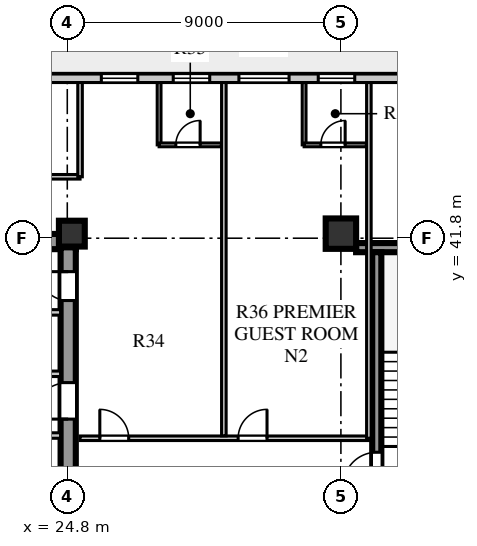
"""IFC4 building model, lengths in metres.
Left out: names, types, materials, properties, quantities, classifications, styles, units other than length and angle.
Written with IfcOpenShell. Run it as: python <this file> out.ifc"""

import sys

from ifc_helpers import new_model, si_unit, direction, frame, frame_2d, origin, origin_2d, place, context, subcontext, project, spatial, rectangle, extrude, element, fill, save


model = new_model("IFC4")
c1 = context("Model", 3, precision=1e-05, world=origin(), true_north=direction((0.0, 1.0)))
c2 = subcontext(c1, "Body", "Model", "MODEL_VIEW")
j1 = project(units=[si_unit("LENGTHUNIT", "METRE"), si_unit("PLANEANGLEUNIT", "RADIAN")], contexts=[c1])
p1 = place(None, origin())
s1 = spatial("IfcSite", under=j1, at=p1, CompositionType="ELEMENT")
p2 = place(p1, origin())
s2 = spatial("IfcBuilding", under=s1, at=p2, CompositionType="ELEMENT")
p3 = place(p2, frame((0.0, 0.0, 127.1)))
s3 = spatial("IfcBuildingStorey", under=s2, at=p3, CompositionType="ELEMENT", Elevation=127.1)
p4 = place(p3, frame((15.4, 41.69, 0.0), z_axis=(0.0, 0.0, 1.0), x_axis=(1.0, 0.0, 0.0)))
e1 = element("IfcWall", 1, at=p4, inside=s3, PredefinedType="SHEAR", context=c2, shape_type="SweptSolid", body=[
    extrude(rectangle(XDim=9.68, YDim=0.5, at=frame_2d((4.84, 0.0))), origin(), (0.0, 0.0, 1.0), 3.6),
])
p5 = place(p3, frame((24.83, 15.74, 0.0), z_axis=(0.0, 0.0, 1.0), x_axis=(0.0, 1.0, 0.0)))
e2 = element("IfcWall", 2, at=p5, inside=s3, PredefinedType="SHEAR", context=c2, shape_type="SweptSolid", body=[
    extrude(rectangle(XDim=25.76, YDim=0.5, at=frame_2d((12.88, 0.0))), origin(), (0.0, 0.0, 1.0), 3.6),
])
p6 = place(p5, frame((1.61, 0.0, 0.0)))
e3 = element("IfcOpeningElement", 3, at=p6, cuts=e2, PredefinedType="OPENING", context=c2, shape_type="SweptSolid", body=[
    extrude(rectangle(XDim=1.2, YDim=2.1, at=frame_2d((0.6, 1.05))), frame((0.0, 0.26, 0.0), z_axis=(0.0, -1.0, 0.0), x_axis=(1.0, 0.0, 0.0)), (0.0, 0.0, 1.0), 0.52),
])
p7 = place(p5, frame((6.78, 0.0, 0.0)))
e4 = element("IfcOpeningElement", 4, at=p7, cuts=e2, PredefinedType="OPENING", context=c2, shape_type="SweptSolid", body=[
    extrude(rectangle(XDim=0.85, YDim=2.06, at=frame_2d((0.425, 1.03))), frame((0.0, 0.26, 0.0), z_axis=(0.0, -1.0, 0.0), x_axis=(1.0, 0.0, 0.0)), (0.0, 0.0, 1.0), 0.52),
])
p8 = place(p5, frame((12.11, 0.0, 0.0)))
e5 = element("IfcOpeningElement", 5, at=p8, cuts=e2, PredefinedType="OPENING", context=c2, shape_type="SweptSolid", body=[
    extrude(rectangle(XDim=1.5, YDim=2.12, at=frame_2d((0.75, 1.06))), frame((0.0, 0.26, 0.0), z_axis=(0.0, -1.0, 0.0), x_axis=(1.0, 0.0, 0.0)), (0.0, 0.0, 1.0), 0.52),
])
p9 = place(p5, frame((20.11, 0.0, 0.0)))
e6 = element("IfcOpeningElement", 6, at=p9, cuts=e2, PredefinedType="OPENING", context=c2, shape_type="SweptSolid", body=[
    extrude(rectangle(XDim=1.2, YDim=2.12, at=frame_2d((0.6, 1.06))), frame((0.0, 0.26, 0.0), z_axis=(0.0, -1.0, 0.0), x_axis=(1.0, 0.0, 0.0)), (0.0, 0.0, 1.0), 0.52),
])
p10 = place(p5, frame((24.01, 0.0, 0.0)))
e7 = element("IfcOpeningElement", 7, at=p10, cuts=e2, PredefinedType="OPENING", context=c2, shape_type="SweptSolid", body=[
    extrude(rectangle(XDim=0.95, YDim=2.1, at=frame_2d((0.475, 1.05))), frame((0.0, 0.26, 0.0), z_axis=(0.0, -1.0, 0.0), x_axis=(1.0, 0.0, 0.0)), (0.0, 0.0, 1.0), 0.52),
])
p11 = place(p3, frame((34.3, 41.49, 0.0), z_axis=(0.0, 0.0, 1.0), x_axis=(1.0, 0.0, 0.0)))
e8 = element("IfcWall", 8, at=p11, inside=s3, PredefinedType="SHEAR", context=c2, shape_type="SweptSolid", body=[
    extrude(rectangle(XDim=4.57, YDim=0.3, at=frame_2d((2.285, 0.0))), origin(), (0.0, 0.0, 1.0), 3.6),
])
p12 = place(p3, frame((34.98, 33.31, 0.0), z_axis=(0.0, 0.0, 1.0), x_axis=(0.0, 1.0, 0.0)))
e9 = element("IfcWall", 9, at=p12, inside=s3, PredefinedType="SHEAR", context=c2, shape_type="SweptSolid", body=[
    extrude(rectangle(XDim=8.03, YDim=0.3, at=frame_2d((4.015, 0.0))), origin(), (0.0, 0.0, 1.0), 3.6),
])
p13 = place(p12, frame((0.35, 0.0, 0.0)))
e10 = element("IfcOpeningElement", 10, at=p13, cuts=e9, PredefinedType="OPENING", context=c2, shape_type="SweptSolid", body=[
    extrude(rectangle(XDim=1.1, YDim=2.1, at=frame_2d((0.55, 1.05))), frame((0.0, 0.16, 0.0), z_axis=(0.0, -1.0, 0.0), x_axis=(1.0, 0.0, 0.0)), (0.0, 0.0, 1.0), 0.32),
])
p14 = place(p3, frame((24.95, 41.95, 0.0), z_axis=(0.0, 0.0, 1.0), x_axis=(1.0, 0.0, 0.0)))
e11 = element("IfcColumn", 11, at=p14, inside=s3, PredefinedType="COLUMN", context=c2, shape_type="SweptSolid", body=[
    extrude(rectangle(XDim=0.85, YDim=0.85, at=origin_2d()), origin(), (0.0, 0.0, 1.0), 3.6),
])
p15 = place(p3, frame((33.8, 41.95, 0.0), z_axis=(0.0, 0.0, 1.0), x_axis=(1.0, 0.0, 0.0)))
e12 = element("IfcColumn", 12, at=p15, inside=s3, PredefinedType="COLUMN", context=c2, shape_type="SweptSolid", body=[
    extrude(rectangle(XDim=1.0, YDim=1.0, at=origin_2d()), origin(), (0.0, 0.0, 1.0), 3.6),
])
p16 = place(p3, frame((45.35, 47.06, 0.0), z_axis=(0.0, 0.0, 1.0), x_axis=(-1.0, 0.0, 0.0)))
e13 = element("IfcWall", 13, at=p16, inside=s3, PredefinedType="STANDARD", context=c2, shape_type="SweptSolid", body=[
    extrude(rectangle(XDim=32.1, YDim=0.28, at=frame_2d((16.05, 0.0))), origin(), (0.0, 0.0, 1.0), 3.6),
])
p17 = place(p16, frame((30.15, 0.0, 0.0)))
e14 = element("IfcOpeningElement", 14, at=p17, cuts=e13, PredefinedType="OPENING", context=c2, shape_type="SweptSolid", body=[
    extrude(rectangle(XDim=1.0, YDim=2.05, at=frame_2d((0.5, 1.025))), frame((0.0, 0.15, 0.0), z_axis=(0.0, -1.0, 0.0), x_axis=(1.0, 0.0, 0.0)), (0.0, 0.0, 1.0), 0.3),
])
p18 = place(p16, frame((23.97, 0.0, 0.8)))
e15 = element("IfcOpeningElement", 15, at=p18, cuts=e13, PredefinedType="OPENING", context=c2, shape_type="SweptSolid", body=[
    extrude(rectangle(XDim=2.4, YDim=2.05, at=frame_2d((1.2, 1.025))), frame((0.0, 0.15, 0.0), z_axis=(0.0, -1.0, 0.0), x_axis=(1.0, 0.0, 0.0)), (0.0, 0.0, 1.0), 0.3),
])
p19 = place(p16, frame((18.23, 0.0, 0.8)))
e16 = element("IfcOpeningElement", 16, at=p19, cuts=e13, PredefinedType="OPENING", context=c2, shape_type="SweptSolid", body=[
    extrude(rectangle(XDim=1.2, YDim=1.75, at=frame_2d((0.6, 0.875))), frame((0.0, 0.15, 0.0), z_axis=(0.0, -1.0, 0.0), x_axis=(1.0, 0.0, 0.0)), (0.0, 0.0, 1.0), 0.3),
])
p20 = place(p16, frame((15.865, 0.0, 0.8)))
e17 = element("IfcOpeningElement", 17, at=p20, cuts=e13, PredefinedType="OPENING", context=c2, shape_type="SweptSolid", body=[
    extrude(rectangle(XDim=1.2, YDim=1.75, at=frame_2d((0.6, 0.875))), frame((0.0, 0.15, 0.0), z_axis=(0.0, -1.0, 0.0), x_axis=(1.0, 0.0, 0.0)), (0.0, 0.0, 1.0), 0.3),
])
p21 = place(p16, frame((13.255, 0.0, 0.8)))
e18 = element("IfcOpeningElement", 18, at=p21, cuts=e13, PredefinedType="OPENING", context=c2, shape_type="SweptSolid", body=[
    extrude(rectangle(XDim=1.65, YDim=1.95, at=frame_2d((0.825, 0.975))), frame((0.0, 0.15, 0.0), z_axis=(0.0, -1.0, 0.0), x_axis=(1.0, 0.0, 0.0)), (0.0, 0.0, 1.0), 0.3),
])
p22 = place(p16, frame((11.095, 0.0, 0.8)))
e19 = element("IfcOpeningElement", 19, at=p22, cuts=e13, PredefinedType="OPENING", context=c2, shape_type="SweptSolid", body=[
    extrude(rectangle(XDim=1.2, YDim=1.75, at=frame_2d((0.6, 0.875))), frame((0.0, 0.15, 0.0), z_axis=(0.0, -1.0, 0.0), x_axis=(1.0, 0.0, 0.0)), (0.0, 0.0, 1.0), 0.3),
])
p23 = place(p16, frame((6.455, 0.0, 0.8)))
e20 = element("IfcOpeningElement", 20, at=p23, cuts=e13, PredefinedType="OPENING", context=c2, shape_type="SweptSolid", body=[
    extrude(rectangle(XDim=2.25, YDim=2.0, at=frame_2d((1.125, 1.0))), frame((0.0, 0.15, 0.0), z_axis=(0.0, -1.0, 0.0), x_axis=(1.0, 0.0, 0.0)), (0.0, 0.0, 1.0), 0.3),
])
p24 = place(p16, frame((1.42, 0.0, 0.8)))
e21 = element("IfcOpeningElement", 21, at=p24, cuts=e13, PredefinedType="OPENING", context=c2, shape_type="SweptSolid", body=[
    extrude(rectangle(XDim=1.8, YDim=2.0, at=frame_2d((0.9, 1.0))), frame((0.0, 0.15, 0.0), z_axis=(0.0, -1.0, 0.0), x_axis=(1.0, 0.0, 0.0)), (0.0, 0.0, 1.0), 0.3),
])
p25 = place(p3, frame((22.02, 35.31, 0.0), z_axis=(0.0, 0.0, 1.0), x_axis=(1.0, 0.0, 0.0)))
e22 = element("IfcWall", 22, at=p25, inside=s3, PredefinedType="SOLIDWALL", context=c2, shape_type="SweptSolid", body=[
    extrude(rectangle(XDim=2.56, YDim=0.18, at=frame_2d((1.28, 0.0))), origin(), (0.0, 0.0, 1.0), 3.6),
])
p26 = place(p25, frame((0.55, 0.0, 0.0)))
e23 = element("IfcOpeningElement", 23, at=p26, cuts=e22, PredefinedType="OPENING", context=c2, shape_type="SweptSolid", body=[
    extrude(rectangle(XDim=1.0, YDim=2.1, at=frame_2d((0.5, 1.05))), frame((0.0, 0.1, 0.0), z_axis=(0.0, -1.0, 0.0), x_axis=(1.0, 0.0, 0.0)), (0.0, 0.0, 1.0), 0.2),
])
p27 = place(p3, frame((19.64, 37.34, 0.0), z_axis=(0.0, 0.0, 1.0), x_axis=(1.0, 0.0, 0.0)))
e24 = element("IfcWall", 24, at=p27, inside=s3, PredefinedType="SOLIDWALL", context=c2, shape_type="SweptSolid", body=[
    extrude(rectangle(XDim=4.94, YDim=0.18, at=frame_2d((2.47, 0.0))), origin(), (0.0, 0.0, 1.0), 3.6),
])
p28 = place(p27, frame((0.45, 0.0, 0.0)))
e25 = element("IfcOpeningElement", 25, at=p28, cuts=e24, PredefinedType="OPENING", context=c2, shape_type="SweptSolid", body=[
    extrude(rectangle(XDim=1.0, YDim=2.1, at=frame_2d((0.5, 1.05))), frame((0.0, 0.1, 0.0), z_axis=(0.0, -1.0, 0.0), x_axis=(1.0, 0.0, 0.0)), (0.0, 0.0, 1.0), 0.2),
])
p29 = place(p27, frame((2.5, 0.0, 0.0)))
e26 = element("IfcOpeningElement", 26, at=p29, cuts=e24, PredefinedType="OPENING", context=c2, shape_type="SweptSolid", body=[
    extrude(rectangle(XDim=1.0, YDim=2.1, at=frame_2d((0.5, 1.05))), frame((0.0, 0.1, 0.0), z_axis=(0.0, -1.0, 0.0), x_axis=(1.0, 0.0, 0.0)), (0.0, 0.0, 1.0), 0.2),
])
p30 = place(p3, frame((19.64, 39.36, 0.0), z_axis=(0.0, 0.0, 1.0), x_axis=(1.0, 0.0, 0.0)))
e27 = element("IfcWall", 27, at=p30, inside=s3, PredefinedType="SOLIDWALL", context=c2, shape_type="SweptSolid", body=[
    extrude(rectangle(XDim=4.94, YDim=0.18, at=frame_2d((2.47, 0.0))), origin(), (0.0, 0.0, 1.0), 3.6),
])
p31 = place(p3, frame((25.22, 35.22, 0.0), z_axis=(0.0, 0.0, 1.0), x_axis=(1.0, 0.0, 0.0)))
e28 = element("IfcWall", 28, at=p31, inside=s3, PredefinedType="PARTITIONING", context=c2, shape_type="SweptSolid", body=[
    extrude(rectangle(XDim=9.5, YDim=0.15, at=frame_2d((4.75, 0.0))), origin(), (0.0, 0.0, 1.0), 3.6),
])
p32 = place(p31, frame((0.65, 0.0, 0.0)))
e29 = element("IfcOpeningElement", 29, at=p32, cuts=e28, PredefinedType="OPENING", context=c2, shape_type="SweptSolid", body=[
    extrude(rectangle(XDim=0.95, YDim=2.1, at=frame_2d((0.475, 1.05))), frame((0.0, 0.085, 0.0), z_axis=(0.0, -1.0, 0.0), x_axis=(1.0, 0.0, 0.0)), (0.0, 0.0, 1.0), 0.17),
])
p33 = place(p31, frame((5.2, 0.0, 0.0)))
e30 = element("IfcOpeningElement", 30, at=p33, cuts=e28, PredefinedType="OPENING", context=c2, shape_type="SweptSolid", body=[
    extrude(rectangle(XDim=0.95, YDim=2.1, at=frame_2d((0.475, 1.05))), frame((0.0, 0.085, 0.0), z_axis=(0.0, -1.0, 0.0), x_axis=(1.0, 0.0, 0.0)), (0.0, 0.0, 1.0), 0.17),
])
p34 = place(p3, frame((13.59, 43.82, 0.0), z_axis=(0.0, 0.0, 1.0), x_axis=(1.0, 0.0, 0.0)))
e31 = element("IfcWall", 31, at=p34, inside=s3, PredefinedType="PARTITIONING", context=c2, shape_type="SweptSolid", body=[
    extrude(rectangle(XDim=11.63, YDim=0.15, at=frame_2d((5.815, 0.0))), origin(), (0.0, 0.0, 1.0), 3.6),
])
p35 = place(p34, frame((4.56, 0.0, 0.0)))
e32 = element("IfcOpeningElement", 32, at=p35, cuts=e31, PredefinedType="OPENING", context=c2, shape_type="SweptSolid", body=[
    extrude(rectangle(XDim=1.0, YDim=2.08, at=frame_2d((0.5, 1.04))), frame((0.0, 0.085, 0.0), z_axis=(0.0, -1.0, 0.0), x_axis=(1.0, 0.0, 0.0)), (0.0, 0.0, 1.0), 0.17),
])
p36 = place(p3, frame((25.22, 43.82, 0.0), z_axis=(0.0, 0.0, 1.0), x_axis=(0.0, 1.0, 0.0)))
e33 = element("IfcWall", 33, at=p36, inside=s3, PredefinedType="PARTITIONING", context=c2, shape_type="SweptSolid", body=[
    extrude(rectangle(XDim=3.1, YDim=0.15, at=frame_2d((1.55, 0.0))), origin(), (0.0, 0.0, 1.0), 3.1),
])
p37 = place(p3, frame((34.72, 35.22, 0.0), z_axis=(0.0, 0.0, 1.0), x_axis=(0.0, 1.0, 0.0)))
e34 = element("IfcWall", 34, at=p37, inside=s3, PredefinedType="PARTITIONING", context=c2, shape_type="SweptSolid", body=[
    extrude(rectangle(XDim=11.7, YDim=0.15, at=frame_2d((5.85, 0.0))), origin(), (0.0, 0.0, 1.0), 3.6),
])
p38 = place(p3, frame((29.95, 35.3, 0.0), z_axis=(0.0, 0.0, 1.0), x_axis=(0.0, 1.0, 0.0)))
e35 = element("IfcWall", 35, at=p38, inside=s3, PredefinedType="PARTITIONING", context=c2, shape_type="SweptSolid", body=[
    extrude(rectangle(XDim=11.62, YDim=0.15, at=frame_2d((5.81, 0.0))), origin(), (0.0, 0.0, 1.0), 3.6),
])
p39 = place(p3, frame((27.82, 44.87, 0.0), z_axis=(0.0, 0.0, 1.0), x_axis=(0.0, 1.0, 0.0)))
e36 = element("IfcWall", 36, at=p39, inside=s3, PredefinedType="PLUMBINGWALL", context=c2, shape_type="SweptSolid", body=[
    extrude(rectangle(XDim=2.05, YDim=0.125, at=frame_2d((1.025, 0.0))), origin(), (0.0, 0.0, 1.0), 3.6),
])
p40 = place(p3, frame((27.82, 44.87, 0.0), z_axis=(0.0, 0.0, 1.0), x_axis=(1.0, 0.0, 0.0)))
e37 = element("IfcWall", 37, at=p40, inside=s3, PredefinedType="PLUMBINGWALL", context=c2, shape_type="SweptSolid", body=[
    extrude(rectangle(XDim=2.05, YDim=0.125, at=frame_2d((1.025, 0.0))), origin(), (0.0, 0.0, 1.0), 3.6),
])
p41 = place(p40, frame((0.55, 0.0, 0.0)))
e38 = element("IfcOpeningElement", 38, at=p41, cuts=e37, PredefinedType="OPENING", context=c2, shape_type="SweptSolid", body=[
    extrude(rectangle(XDim=0.8, YDim=2.05, at=frame_2d((0.4, 1.025))), frame((0.0, 0.073, 0.0), z_axis=(0.0, -1.0, 0.0), x_axis=(1.0, 0.0, 0.0)), (0.0, 0.0, 1.0), 0.145),
])
p42 = place(p3, frame((32.59, 44.87, 0.0), z_axis=(0.0, 0.0, 1.0), x_axis=(0.0, 1.0, 0.0)))
e39 = element("IfcWall", 39, at=p42, inside=s3, PredefinedType="PLUMBINGWALL", context=c2, shape_type="SweptSolid", body=[
    extrude(rectangle(XDim=2.05, YDim=0.125, at=frame_2d((1.025, 0.0))), origin(), (0.0, 0.0, 1.0), 3.6),
])
p43 = place(p3, frame((32.59, 44.87, 0.0), z_axis=(0.0, 0.0, 1.0), x_axis=(1.0, 0.0, 0.0)))
e40 = element("IfcWall", 40, at=p43, inside=s3, PredefinedType="PLUMBINGWALL", context=c2, shape_type="SweptSolid", body=[
    extrude(rectangle(XDim=2.05, YDim=0.125, at=frame_2d((1.025, 0.0))), origin(), (0.0, 0.0, 1.0), 3.6),
])
p44 = place(p43, frame((0.55, 0.0, 0.0)))
e41 = element("IfcOpeningElement", 41, at=p44, cuts=e40, PredefinedType="OPENING", context=c2, shape_type="SweptSolid", body=[
    extrude(rectangle(XDim=0.8, YDim=2.05, at=frame_2d((0.4, 1.025))), frame((0.0, 0.073, 0.0), z_axis=(0.0, -1.0, 0.0), x_axis=(1.0, 0.0, 0.0)), (0.0, 0.0, 1.0), 0.145),
])
p45 = place(p19, origin())
e42 = element("IfcWindow", 42, at=p45, inside=s3, PartitioningType="SINGLE_PANEL", PredefinedType="WINDOW", context=c2, shape_type="SweptSolid", body=[
    extrude(rectangle(XDim=1.2, YDim=1.75, at=frame_2d((0.6, 0.875))), frame((0.0, 0.03, 0.0), z_axis=(0.0, -1.0, 0.0), x_axis=(1.0, 0.0, 0.0)), (0.0, 0.0, 1.0), 0.06),
])
fill(e16, e42)
p46 = place(p20, origin())
e43 = element("IfcWindow", 43, at=p46, inside=s3, PartitioningType="SINGLE_PANEL", PredefinedType="WINDOW", context=c2, shape_type="SweptSolid", body=[
    extrude(rectangle(XDim=1.2, YDim=1.75, at=frame_2d((0.6, 0.875))), frame((0.0, 0.03, 0.0), z_axis=(0.0, -1.0, 0.0), x_axis=(1.0, 0.0, 0.0)), (0.0, 0.0, 1.0), 0.06),
])
fill(e17, e43)
p47 = place(p21, origin())
e44 = element("IfcWindow", 44, at=p47, inside=s3, PartitioningType="SINGLE_PANEL", PredefinedType="WINDOW", context=c2, shape_type="SweptSolid", body=[
    extrude(rectangle(XDim=1.65, YDim=1.95, at=frame_2d((0.825, 0.975))), frame((0.0, 0.03, 0.0), z_axis=(0.0, -1.0, 0.0), x_axis=(1.0, 0.0, 0.0)), (0.0, 0.0, 1.0), 0.06),
])
fill(e18, e44)
p48 = place(p22, origin())
e45 = element("IfcWindow", 45, at=p48, inside=s3, PartitioningType="SINGLE_PANEL", PredefinedType="WINDOW", context=c2, shape_type="SweptSolid", body=[
    extrude(rectangle(XDim=1.2, YDim=1.75, at=frame_2d((0.6, 0.875))), frame((0.0, 0.03, 0.0), z_axis=(0.0, -1.0, 0.0), x_axis=(1.0, 0.0, 0.0)), (0.0, 0.0, 1.0), 0.06),
])
fill(e19, e45)
p49 = place(p9, frame((1.2, 0.0, 0.0), z_axis=(0.0, 0.0, 1.0), x_axis=(-1.0, 0.0, 0.0)))
e46 = element("IfcDoor", 46, at=p49, inside=s3, OperationType="SINGLE_SWING_RIGHT", PredefinedType="DOOR", context=c2, shape_type="SweptSolid", body=[
    extrude(rectangle(XDim=1.2, YDim=2.12, at=frame_2d((0.6, 1.06))), frame((0.0, 0.025, 0.0), z_axis=(0.0, -1.0, 0.0), x_axis=(1.0, 0.0, 0.0)), (0.0, 0.0, 1.0), 0.05),
])
fill(e6, e46)
p50 = place(p10, frame((0.95, 0.0, 0.0), z_axis=(0.0, 0.0, 1.0), x_axis=(-1.0, 0.0, 0.0)))
e47 = element("IfcDoor", 47, at=p50, inside=s3, OperationType="SINGLE_SWING_LEFT", PredefinedType="DOOR", context=c2, shape_type="SweptSolid", body=[
    extrude(rectangle(XDim=0.95, YDim=2.1, at=frame_2d((0.475, 1.05))), frame((0.0, 0.025, 0.0), z_axis=(0.0, -1.0, 0.0), x_axis=(1.0, 0.0, 0.0)), (0.0, 0.0, 1.0), 0.05),
])
fill(e7, e47)
p51 = place(p13, origin())
e48 = element("IfcDoor", 48, at=p51, inside=s3, OperationType="SINGLE_SWING_LEFT", PredefinedType="DOOR", context=c2, shape_type="SweptSolid", body=[
    extrude(rectangle(XDim=1.1, YDim=2.1, at=frame_2d((0.55, 1.05))), frame((0.0, 0.025, 0.0), z_axis=(0.0, -1.0, 0.0), x_axis=(1.0, 0.0, 0.0)), (0.0, 0.0, 1.0), 0.05),
])
fill(e10, e48)
p52 = place(p32, origin())
e49 = element("IfcDoor", 49, at=p52, inside=s3, OperationType="SINGLE_SWING_LEFT", PredefinedType="DOOR", context=c2, shape_type="SweptSolid", body=[
    extrude(rectangle(XDim=0.95, YDim=2.1, at=frame_2d((0.475, 1.05))), frame((0.0, 0.025, 0.0), z_axis=(0.0, -1.0, 0.0), x_axis=(1.0, 0.0, 0.0)), (0.0, 0.0, 1.0), 0.05),
])
fill(e29, e49)
p53 = place(p41, frame((0.8, 0.0, 0.0), z_axis=(0.0, 0.0, 1.0), x_axis=(-1.0, 0.0, 0.0)))
e50 = element("IfcDoor", 50, at=p53, inside=s3, OperationType="SINGLE_SWING_LEFT", PredefinedType="DOOR", context=c2, shape_type="SweptSolid", body=[
    extrude(rectangle(XDim=0.8, YDim=2.05, at=frame_2d((0.4, 1.025))), frame((0.0, 0.025, 0.0), z_axis=(0.0, -1.0, 0.0), x_axis=(1.0, 0.0, 0.0)), (0.0, 0.0, 1.0), 0.05),
])
fill(e38, e50)
p54 = place(p33, origin())
e51 = element("IfcDoor", 51, at=p54, inside=s3, OperationType="SINGLE_SWING_RIGHT", PredefinedType="DOOR", context=c2, shape_type="SweptSolid", body=[
    extrude(rectangle(XDim=0.95, YDim=2.1, at=frame_2d((0.475, 1.05))), frame((0.0, 0.025, 0.0), z_axis=(0.0, -1.0, 0.0), x_axis=(1.0, 0.0, 0.0)), (0.0, 0.0, 1.0), 0.05),
])
fill(e30, e51)
p55 = place(p44, frame((0.8, 0.0, 0.0), z_axis=(0.0, 0.0, 1.0), x_axis=(-1.0, 0.0, 0.0)))
e52 = element("IfcDoor", 52, at=p55, inside=s3, OperationType="SINGLE_SWING_LEFT", PredefinedType="DOOR", context=c2, shape_type="SweptSolid", body=[
    extrude(rectangle(XDim=0.8, YDim=2.05, at=frame_2d((0.4, 1.025))), frame((0.0, 0.025, 0.0), z_axis=(0.0, -1.0, 0.0), x_axis=(1.0, 0.0, 0.0)), (0.0, 0.0, 1.0), 0.05),
])
fill(e41, e52)
save(model, sys.argv[1])
